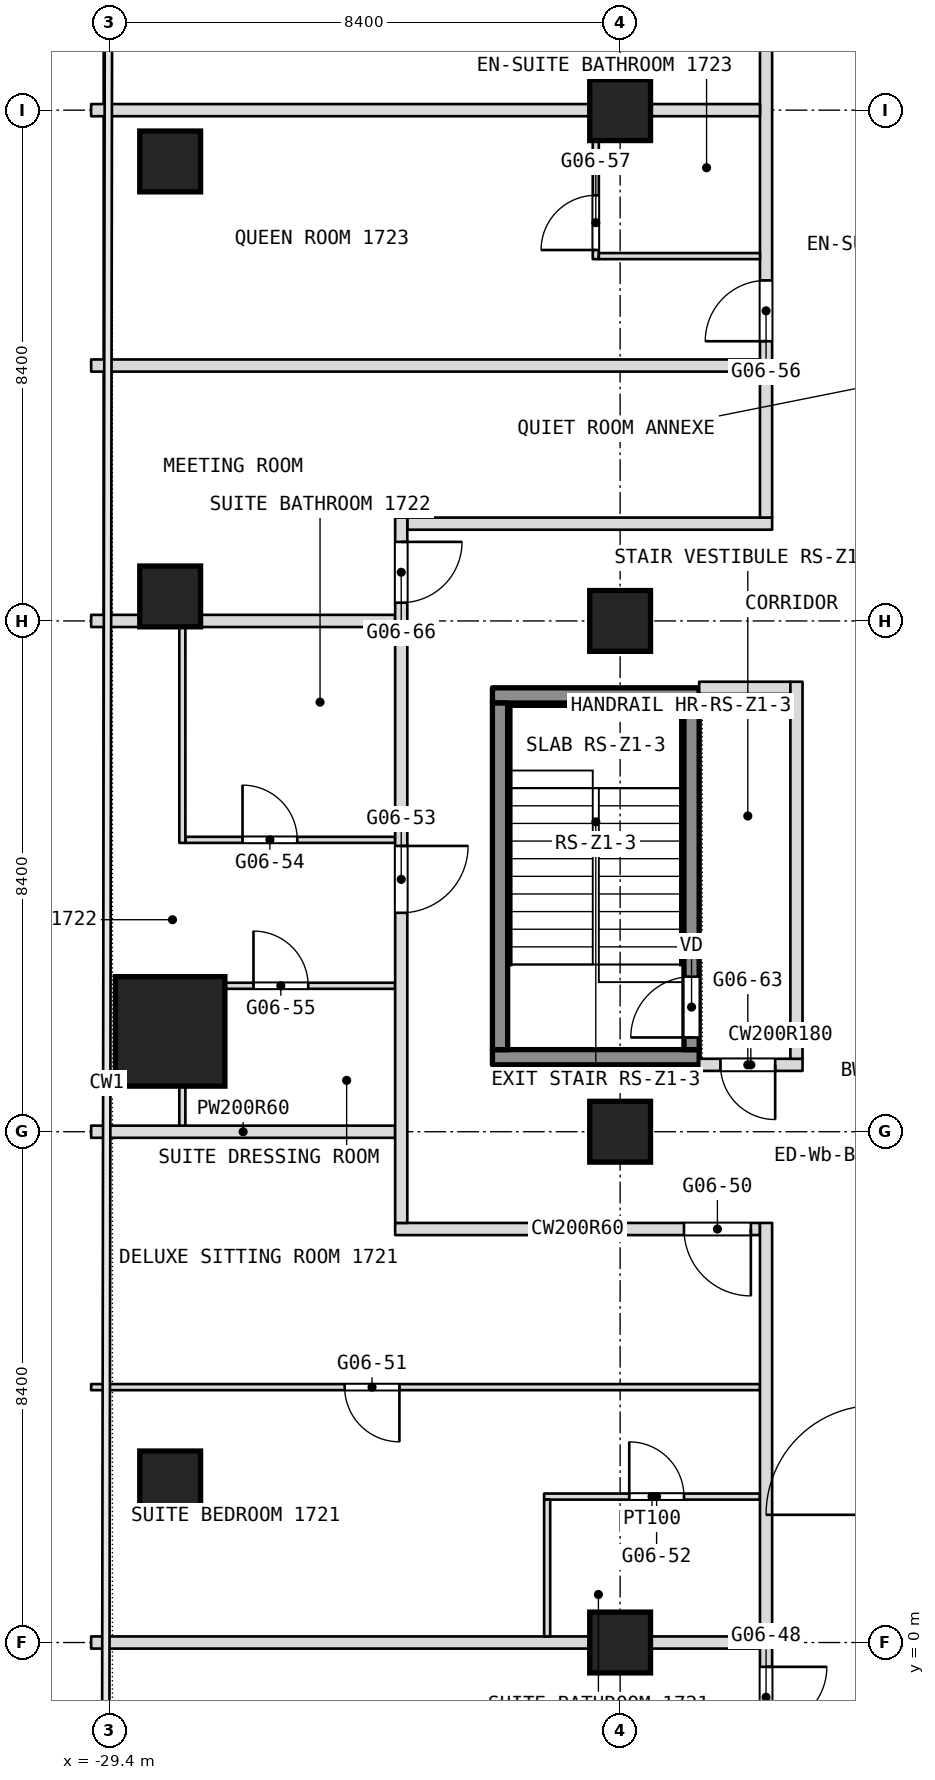
"""IFC4 building model, lengths in metres.
Left out: names, types, materials, properties, quantities, classifications, styles, units other than length and angle.
Written with IfcOpenShell. Run it as: python <this file> out.ifc"""

import sys

from ifc_helpers import new_model, si_unit, direction, frame, frame_2d, origin, origin_2d, place, context, subcontext, project, spatial, rectangle, extrude, element, fill, save


model = new_model("IFC4")
c1 = context("Model", 3, precision=1e-05, world=origin(), true_north=direction((0.0, 1.0)))
c2 = subcontext(c1, "Body", "Model", "MODEL_VIEW")
j1 = project(units=[si_unit("LENGTHUNIT", "METRE"), si_unit("PLANEANGLEUNIT", "RADIAN")], contexts=[c1])
p1 = place(None, origin())
s1 = spatial("IfcSite", under=j1, at=p1, CompositionType="ELEMENT")
p2 = place(p1, origin())
s2 = spatial("IfcBuilding", under=s1, at=p2, CompositionType="ELEMENT")
p3 = place(p2, frame((0.0, 0.0, 76.1)))
s3 = spatial("IfcBuildingStorey", under=s2, at=p3, CompositionType="ELEMENT", Elevation=76.1)
p4 = place(p3, frame((-28.4, 10.05, 0.0), z_axis=(0.0, 0.0, 1.0), x_axis=(1.0, 0.0, 0.0)))
e1 = element("IfcColumn", 1, at=p4, inside=s3, PredefinedType="COLUMN", context=c2, shape_type="SweptSolid", body=[
    extrude(rectangle(XDim=1.8, YDim=1.8, at=origin_2d()), origin(), (0.0, 0.0, 1.0), 3.6),
])
for number, where, z_axis, x_axis in (
    (2, (-21.0, 0.0, 0.0), (0.0, 0.0, 1.0), (1.0, 0.0, 0.0)),
    (3, (-21.0, 8.4, 0.0), (0.0, 0.0, 1.0), (1.0, 0.0, 0.0)),
    (4, (-21.0, 16.8, 0.0), (0.0, 0.0, 1.0), (1.0, 0.0, 0.0)),
    (5, (-21.0, 25.2, 0.0), (0.0, 0.0, 1.0), (1.0, 0.0, 0.0)),
    (6, (-28.4, 2.649, 0.0), (0.0, 0.0, 1.0), (1.0, 0.0, 0.0)),
    (7, (-28.4, 17.203, 0.0), (0.0, 0.0, 1.0), (1.0, 0.0, 0.0)),
    (8, (-28.4, 24.356, 0.0), (0.0, 0.0, 1.0), (1.0, 0.0, 0.0)),
):
    element("IfcColumn", number, at=place(p3, frame(where, z_axis=z_axis, x_axis=x_axis)), inside=s3, PredefinedType="COLUMN", context=c2, shape_type="SweptSolid", body=[
        extrude(rectangle(XDim=1.0, YDim=1.0, at=origin_2d()), origin(), (0.0, 0.0, 1.0), 3.6),
    ])
p5 = place(p3, frame((-29.7, 0.0, 0.0), z_axis=(0.0, 0.0, 1.0), x_axis=(1.0, 0.0, 0.0)))
e9 = element("IfcWall", 9, at=p5, inside=s3, PredefinedType="PARTITIONING", context=c2, shape_type="SweptSolid", body=[
    extrude(rectangle(XDim=11.0, YDim=0.2, at=frame_2d((5.5, 0.0))), origin(), (0.0, 0.0, 1.0), 2.84),
])
p6 = place(p3, frame((-22.25, 2.4, 0.0), z_axis=(0.0, 0.0, 1.0), x_axis=(1.0, 0.0, 0.0)))
e10 = element("IfcWall", 10, at=p6, inside=s3, PredefinedType="PARTITIONING", context=c2, shape_type="SweptSolid", body=[
    extrude(rectangle(XDim=3.55, YDim=0.1, at=frame_2d((1.775, 0.0))), origin(), (0.0, 0.0, 1.0), 3.34),
])
p7 = place(p6, frame((1.4, 0.0, 0.0)))
e11 = element("IfcOpeningElement", 11, at=p7, cuts=e10, PredefinedType="OPENING", context=c2, shape_type="SweptSolid", body=[
    extrude(rectangle(XDim=0.9, YDim=2.1, at=frame_2d((0.45, 1.05))), frame((0.0, 0.05, 0.0), z_axis=(0.0, -1.0, 0.0), x_axis=(1.0, 0.0, 0.0)), (0.0, 0.0, 1.0), 0.1),
])
p8 = place(p3, frame((-29.7, 4.2, 0.0), z_axis=(0.0, 0.0, 1.0), x_axis=(1.0, 0.0, 0.0)))
e12 = element("IfcWall", 12, at=p8, inside=s3, PredefinedType="PARTITIONING", context=c2, shape_type="SweptSolid", body=[
    extrude(rectangle(XDim=11.0, YDim=0.1, at=frame_2d((5.5, 0.0))), origin(), (0.0, 0.0, 1.0), 3.34),
])
p9 = place(p8, frame((4.17, 0.0, 0.0)))
e13 = element("IfcOpeningElement", 13, at=p9, cuts=e12, PredefinedType="OPENING", context=c2, shape_type="SweptSolid", body=[
    extrude(rectangle(XDim=0.9, YDim=2.1, at=frame_2d((0.45, 1.05))), frame((0.0, 0.05, 0.0), z_axis=(0.0, -1.0, 0.0), x_axis=(1.0, 0.0, 0.0)), (0.0, 0.0, 1.0), 0.1),
])
p10 = place(p3, frame((-24.7, 6.8, 0.0), z_axis=(0.0, 0.0, 1.0), x_axis=(1.0, 0.0, 0.0)))
e14 = element("IfcWall", 14, at=p10, inside=s3, PredefinedType="PARTITIONING", context=c2, shape_type="SweptSolid", body=[
    extrude(rectangle(XDim=6.0, YDim=0.2, at=frame_2d((3.0, 0.0))), origin(), (0.0, 0.0, 1.0), 3.34),
])
p11 = place(p10, frame((4.75, 0.0, 0.0)))
e15 = element("IfcOpeningElement", 15, at=p11, cuts=e14, PredefinedType="OPENING", context=c2, shape_type="SweptSolid", body=[
    extrude(rectangle(XDim=1.1, YDim=2.1, at=frame_2d((0.55, 1.05))), frame((0.0, 0.1, 0.0), z_axis=(0.0, -1.0, 0.0), x_axis=(1.0, 0.0, 0.0)), (0.0, 0.0, 1.0), 0.2),
])
p12 = place(p3, frame((-29.7, 8.4, 0.0), z_axis=(0.0, 0.0, 1.0), x_axis=(1.0, 0.0, 0.0)))
e16 = element("IfcWall", 16, at=p12, inside=s3, PredefinedType="PARTITIONING", context=c2, shape_type="SweptSolid", body=[
    extrude(rectangle(XDim=5.0, YDim=0.2, at=frame_2d((2.5, 0.0))), origin(), (0.0, 0.0, 1.0), 2.84),
])
p13 = place(p3, frame((-19.7, 9.5, 0.0), z_axis=(0.0, 0.0, 1.0), x_axis=(1.0, 0.0, 0.0)))
e17 = element("IfcWall", 17, at=p13, inside=s3, PredefinedType="PARTITIONING", context=c2, shape_type="SweptSolid", body=[
    extrude(rectangle(XDim=1.7, YDim=0.2, at=frame_2d((0.85, 0.0))), origin(), (0.0, 0.0, 1.0), 3.34),
])
p14 = place(p13, frame((0.35, 0.0, 0.0)))
e18 = element("IfcOpeningElement", 18, at=p14, cuts=e17, PredefinedType="OPENING", context=c2, shape_type="SweptSolid", body=[
    extrude(rectangle(XDim=0.9, YDim=2.1, at=frame_2d((0.45, 1.05))), frame((0.0, 0.1, 0.0), z_axis=(0.0, -1.0, 0.0), x_axis=(1.0, 0.0, 0.0)), (0.0, 0.0, 1.0), 0.2),
])
p15 = place(p3, frame((-27.5, 10.8, 0.0), z_axis=(0.0, 0.0, 1.0), x_axis=(1.0, 0.0, 0.0)))
e19 = element("IfcWall", 19, at=p15, inside=s3, PredefinedType="PARTITIONING", context=c2, shape_type="SweptSolid", body=[
    extrude(rectangle(XDim=2.8, YDim=0.1, at=frame_2d((1.4, 0.0))), origin(), (0.0, 0.0, 1.0), 3.34),
])
p16 = place(p15, frame((0.47, 0.0, 0.0)))
e20 = element("IfcOpeningElement", 20, at=p16, cuts=e19, PredefinedType="OPENING", context=c2, shape_type="SweptSolid", body=[
    extrude(rectangle(XDim=0.9, YDim=2.1, at=frame_2d((0.45, 1.05))), frame((0.0, 0.05, 0.0), z_axis=(0.0, -1.0, 0.0), x_axis=(1.0, 0.0, 0.0)), (0.0, 0.0, 1.0), 0.1),
])
p17 = place(p3, frame((-28.15, 13.2, 0.0), z_axis=(0.0, 0.0, 1.0), x_axis=(1.0, 0.0, 0.0)))
e21 = element("IfcWall", 21, at=p17, inside=s3, PredefinedType="PARTITIONING", context=c2, shape_type="SweptSolid", body=[
    extrude(rectangle(XDim=3.45, YDim=0.1, at=frame_2d((1.725, 0.0))), origin(), (0.0, 0.0, 1.0), 3.34),
])
p18 = place(p17, frame((0.94, 0.0, 0.0)))
e22 = element("IfcOpeningElement", 22, at=p18, cuts=e21, PredefinedType="OPENING", context=c2, shape_type="SweptSolid", body=[
    extrude(rectangle(XDim=0.9, YDim=2.1, at=frame_2d((0.45, 1.05))), frame((0.0, 0.05, 0.0), z_axis=(0.0, -1.0, 0.0), x_axis=(1.0, 0.0, 0.0)), (0.0, 0.0, 1.0), 0.1),
])
p19 = place(p3, frame((-19.7, 15.7, 0.0), z_axis=(0.0, 0.0, 1.0), x_axis=(1.0, 0.0, 0.0)))
e23 = element("IfcWall", 23, at=p19, inside=s3, PredefinedType="PARTITIONING", context=c2, shape_type="SweptSolid", body=[
    extrude(rectangle(XDim=1.5, YDim=0.2, at=frame_2d((0.75, 0.0))), origin(), (0.0, 0.0, 1.0), 3.34),
])
p20 = place(p3, frame((-29.7, 16.8, 0.0), z_axis=(0.0, 0.0, 1.0), x_axis=(1.0, 0.0, 0.0)))
e24 = element("IfcWall", 24, at=p20, inside=s3, PredefinedType="PARTITIONING", context=c2, shape_type="SweptSolid", body=[
    extrude(rectangle(XDim=5.0, YDim=0.2, at=frame_2d((2.5, 0.0))), origin(), (0.0, 0.0, 1.0), 2.84),
])
p21 = place(p3, frame((-18.1, 9.6, 0.0), z_axis=(0.0, 0.0, 1.0), x_axis=(0.0, 1.0, 0.0)))
e25 = element("IfcWall", 25, at=p21, inside=s3, PredefinedType="PARTITIONING", context=c2, shape_type="SweptSolid", body=[
    extrude(rectangle(XDim=6.2, YDim=0.2, at=frame_2d((3.1, 0.0))), origin(), (0.0, 0.0, 1.0), 3.34),
])
p22 = place(p3, frame((-24.5, 18.4, 0.0), z_axis=(0.0, 0.0, 1.0), x_axis=(1.0, 0.0, 0.0)))
e26 = element("IfcWall", 26, at=p22, inside=s3, PredefinedType="PARTITIONING", context=c2, shape_type="SweptSolid", body=[
    extrude(rectangle(XDim=6.0, YDim=0.2, at=frame_2d((3.0, 0.0))), origin(), (0.0, 0.0, 1.0), 3.34),
])
p23 = place(p3, frame((-18.6, -16.665, 0.0), z_axis=(0.0, 0.0, 1.0), x_axis=(0.0, 1.0, 0.0)))
e27 = element("IfcWall", 27, at=p23, inside=s3, PredefinedType="PARTITIONING", context=c2, shape_type="SweptSolid", body=[
    extrude(rectangle(XDim=23.565, YDim=0.2, at=frame_2d((11.782, 0.0))), origin(), (0.0, 0.0, 1.0), 3.34),
])
p24 = place(p23, frame((2.991, 0.0, 0.0)))
e28 = element("IfcOpeningElement", 28, at=p24, cuts=e27, PredefinedType="OPENING", context=c2, shape_type="SweptSolid", body=[
    extrude(rectangle(XDim=1.0, YDim=2.1, at=frame_2d((0.5, 1.05))), frame((0.0, 0.1, 0.0), z_axis=(0.0, -1.0, 0.0), x_axis=(1.0, 0.0, 0.0)), (0.0, 0.0, 1.0), 0.2),
])
p25 = place(p23, frame((4.574, 0.0, 0.0)))
e29 = element("IfcOpeningElement", 29, at=p25, cuts=e27, PredefinedType="OPENING", context=c2, shape_type="SweptSolid", body=[
    extrude(rectangle(XDim=1.0, YDim=2.1, at=frame_2d((0.5, 1.05))), frame((0.0, 0.1, 0.0), z_axis=(0.0, -1.0, 0.0), x_axis=(1.0, 0.0, 0.0)), (0.0, 0.0, 1.0), 0.2),
])
p26 = place(p23, frame((8.665, 0.0, 0.0)))
e30 = element("IfcOpeningElement", 30, at=p26, cuts=e27, PredefinedType="OPENING", context=c2, shape_type="SweptSolid", body=[
    extrude(rectangle(XDim=1.0, YDim=2.1, at=frame_2d((0.5, 1.05))), frame((0.0, 0.1, 0.0), z_axis=(0.0, -1.0, 0.0), x_axis=(1.0, 0.0, 0.0)), (0.0, 0.0, 1.0), 0.2),
])
p27 = place(p23, frame((15.265, 0.0, 0.0)))
e31 = element("IfcOpeningElement", 31, at=p27, cuts=e27, PredefinedType="OPENING", context=c2, shape_type="SweptSolid", body=[
    extrude(rectangle(XDim=1.0, YDim=2.1, at=frame_2d((0.5, 1.05))), frame((0.0, 0.1, 0.0), z_axis=(0.0, -1.0, 0.0), x_axis=(1.0, 0.0, 0.0)), (0.0, 0.0, 1.0), 0.2),
])
p28 = place(p3, frame((-18.6, 18.5, 0.0), z_axis=(0.0, 0.0, 1.0), x_axis=(0.0, 1.0, 0.0)))
e32 = element("IfcWall", 32, at=p28, inside=s3, PredefinedType="PARTITIONING", context=c2, shape_type="SweptSolid", body=[
    extrude(rectangle(XDim=15.04, YDim=0.2, at=frame_2d((7.52, 0.0))), origin(), (0.0, 0.0, 1.0), 3.34),
])
p29 = place(p28, frame((2.9, 0.0, 0.0)))
e33 = element("IfcOpeningElement", 33, at=p29, cuts=e32, PredefinedType="OPENING", context=c2, shape_type="SweptSolid", body=[
    extrude(rectangle(XDim=1.0, YDim=2.1, at=frame_2d((0.5, 1.05))), frame((0.0, 0.1, 0.0), z_axis=(0.0, -1.0, 0.0), x_axis=(1.0, 0.0, 0.0)), (0.0, 0.0, 1.0), 0.2),
])
p30 = place(p28, frame((8.25, 0.0, 0.0)))
e34 = element("IfcOpeningElement", 34, at=p30, cuts=e32, PredefinedType="OPENING", context=c2, shape_type="SweptSolid", body=[
    extrude(rectangle(XDim=1.1, YDim=2.1, at=frame_2d((0.55, 1.05))), frame((0.0, 0.1, 0.0), z_axis=(0.0, -1.0, 0.0), x_axis=(1.0, 0.0, 0.0)), (0.0, 0.0, 1.0), 0.2),
])
p31 = place(p3, frame((-29.7, 21.0, 0.0), z_axis=(0.0, 0.0, 1.0), x_axis=(1.0, 0.0, 0.0)))
e35 = element("IfcWall", 35, at=p31, inside=s3, PredefinedType="PARTITIONING", context=c2, shape_type="SweptSolid", body=[
    extrude(rectangle(XDim=11.0, YDim=0.2, at=frame_2d((5.5, 0.0))), origin(), (0.0, 0.0, 1.0), 3.34),
])
p32 = place(p3, frame((-21.4, 22.75, 0.0), z_axis=(0.0, 0.0, 1.0), x_axis=(0.0, 1.0, 0.0)))
e36 = element("IfcWall", 36, at=p32, inside=s3, PredefinedType="PARTITIONING", context=c2, shape_type="SweptSolid", body=[
    extrude(rectangle(XDim=2.55, YDim=0.1, at=frame_2d((1.275, 0.0))), origin(), (0.0, 0.0, 1.0), 3.34),
])
p33 = place(p32, frame((0.15, 0.0, 0.0)))
e37 = element("IfcOpeningElement", 37, at=p33, cuts=e36, PredefinedType="OPENING", context=c2, shape_type="SweptSolid", body=[
    extrude(rectangle(XDim=0.9, YDim=2.1, at=frame_2d((0.45, 1.05))), frame((0.0, 0.05, 0.0), z_axis=(0.0, -1.0, 0.0), x_axis=(1.0, 0.0, 0.0)), (0.0, 0.0, 1.0), 0.1),
])
p34 = place(p3, frame((-22.2, 0.1, 0.0), z_axis=(0.0, 0.0, 1.0), x_axis=(0.0, 1.0, 0.0)))
e38 = element("IfcWall", 38, at=p34, inside=s3, PredefinedType="PARTITIONING", context=c2, shape_type="SweptSolid", body=[
    extrude(rectangle(XDim=2.25, YDim=0.1, at=frame_2d((1.125, 0.0))), origin(), (0.0, 0.0, 1.0), 3.34),
])
p35 = place(p3, frame((-21.35, 22.8, 0.0), z_axis=(0.0, 0.0, 1.0), x_axis=(1.0, 0.0, 0.0)))
e39 = element("IfcWall", 39, at=p35, inside=s3, PredefinedType="PARTITIONING", context=c2, shape_type="SweptSolid", body=[
    extrude(rectangle(XDim=2.65, YDim=0.1, at=frame_2d((1.325, 0.0))), origin(), (0.0, 0.0, 1.0), 3.34),
])
p36 = place(p3, frame((-24.6, 6.9, 0.0), z_axis=(0.0, 0.0, 1.0), x_axis=(0.0, 1.0, 0.0)))
e40 = element("IfcWall", 40, at=p36, inside=s3, PredefinedType="PARTITIONING", context=c2, shape_type="SweptSolid", body=[
    extrude(rectangle(XDim=11.6, YDim=0.2, at=frame_2d((5.8, 0.0))), origin(), (0.0, 0.0, 1.0), 3.34),
])
p37 = place(p36, frame((5.1, 0.0, 0.0)))
e41 = element("IfcOpeningElement", 41, at=p37, cuts=e40, PredefinedType="OPENING", context=c2, shape_type="SweptSolid", body=[
    extrude(rectangle(XDim=1.1, YDim=2.1, at=frame_2d((0.55, 1.05))), frame((0.0, 0.1, 0.0), z_axis=(0.0, -1.0, 0.0), x_axis=(1.0, 0.0, 0.0)), (0.0, 0.0, 1.0), 0.2),
])
p38 = place(p36, frame((10.2, 0.0, 0.0)))
e42 = element("IfcOpeningElement", 42, at=p38, cuts=e40, PredefinedType="OPENING", context=c2, shape_type="SweptSolid", body=[
    extrude(rectangle(XDim=1.0, YDim=2.1, at=frame_2d((0.5, 1.05))), frame((0.0, 0.1, 0.0), z_axis=(0.0, -1.0, 0.0), x_axis=(1.0, 0.0, 0.0)), (0.0, 0.0, 1.0), 0.2),
])
p39 = place(p3, frame((-29.7, 25.2, 0.0), z_axis=(0.0, 0.0, 1.0), x_axis=(1.0, 0.0, 0.0)))
e43 = element("IfcWall", 43, at=p39, inside=s3, PredefinedType="PARTITIONING", context=c2, shape_type="SweptSolid", body=[
    extrude(rectangle(XDim=11.0, YDim=0.2, at=frame_2d((5.5, 0.0))), origin(), (0.0, 0.0, 1.0), 2.84),
])
p40 = place(p3, frame((-28.2, 8.5, 0.0), z_axis=(0.0, 0.0, 1.0), x_axis=(0.0, 1.0, 0.0)))
e44 = element("IfcWall", 44, at=p40, inside=s3, PredefinedType="PARTITIONING", context=c2, shape_type="SweptSolid", body=[
    extrude(rectangle(XDim=0.65, YDim=0.1, at=frame_2d((0.325, 0.0))), origin(), (0.0, 0.0, 1.0), 2.94),
])
p41 = place(p3, frame((-28.2, 13.15, 0.0), z_axis=(0.0, 0.0, 1.0), x_axis=(0.0, 1.0, 0.0)))
e45 = element("IfcWall", 45, at=p41, inside=s3, PredefinedType="PARTITIONING", context=c2, shape_type="SweptSolid", body=[
    extrude(rectangle(XDim=3.75, YDim=0.1, at=frame_2d((1.875, 0.0))), origin(), (0.0, 0.0, 1.0), 2.94),
])
for number, where, z_axis, x_axis in (
    (46, (-23.1, 9.625, 0.1), (0.0, 0.0, 1.0), (1.0, 0.0, 0.0)),
    (47, (-23.1, 15.575, 0.1), (0.0, 0.0, 1.0), (1.0, 0.0, 0.0)),
):
    element("IfcWall", number, at=place(p3, frame(where, z_axis=z_axis, x_axis=x_axis)), inside=s3, PredefinedType="SHEAR", context=c2, shape_type="SweptSolid", body=[
        extrude(rectangle(XDim=3.4, YDim=0.25, at=frame_2d((1.7, 0.0))), origin(), (0.0, 0.0, 1.0), 3.6),
    ])
p42 = place(p3, frame((-22.975, 9.75, 0.1), z_axis=(0.0, 0.0, 1.0), x_axis=(0.0, 1.0, 0.0)))
e48 = element("IfcWall", 48, at=p42, inside=s3, PredefinedType="SHEAR", context=c2, shape_type="SweptSolid", body=[
    extrude(rectangle(XDim=5.7, YDim=0.25, at=frame_2d((2.85, 0.0))), origin(), (0.0, 0.0, 1.0), 3.6),
])
p43 = place(p3, frame((-19.825, 9.75, 0.1), z_axis=(0.0, 0.0, 1.0), x_axis=(0.0, 1.0, 0.0)))
e49 = element("IfcWall", 49, at=p43, inside=s3, PredefinedType="SHEAR", context=c2, shape_type="SweptSolid", body=[
    extrude(rectangle(XDim=5.7, YDim=0.25, at=frame_2d((2.85, 0.0))), origin(), (0.0, 0.0, 1.0), 3.6),
])
p44 = place(p43, frame((0.2, 0.0, 0.0)))
e50 = element("IfcOpeningElement", 50, at=p44, cuts=e49, PredefinedType="OPENING", context=c2, shape_type="SweptSolid", body=[
    extrude(rectangle(XDim=1.0, YDim=2.1, at=frame_2d((0.5, 1.05))), frame((0.0, 0.125, 0.0), z_axis=(0.0, -1.0, 0.0), x_axis=(1.0, 0.0, 0.0)), (0.0, 0.0, 1.0), 0.25),
])
p45 = place(p7, origin())
e51 = element("IfcDoor", 51, at=p45, inside=s3, OperationType="SINGLE_SWING_LEFT", PredefinedType="DOOR", context=c2, shape_type="SweptSolid", body=[
    extrude(rectangle(XDim=0.9, YDim=2.1, at=frame_2d((0.45, 1.05))), frame((0.0, 0.025, 0.0), z_axis=(0.0, -1.0, 0.0), x_axis=(1.0, 0.0, 0.0)), (0.0, 0.0, 1.0), 0.05),
])
fill(e11, e51)
p46 = place(p9, origin())
e52 = element("IfcDoor", 52, at=p46, inside=s3, OperationType="SINGLE_SWING_LEFT", PredefinedType="DOOR", context=c2, shape_type="SweptSolid", body=[
    extrude(rectangle(XDim=0.9, YDim=2.1, at=frame_2d((0.45, 1.05))), frame((0.0, 0.025, 0.0), z_axis=(0.0, -1.0, 0.0), x_axis=(1.0, 0.0, 0.0)), (0.0, 0.0, 1.0), 0.05),
])
fill(e13, e52)
p47 = place(p11, origin())
e53 = element("IfcDoor", 53, at=p47, inside=s3, OperationType="SINGLE_SWING_LEFT", PredefinedType="DOOR", context=c2, shape_type="SweptSolid", body=[
    extrude(rectangle(XDim=1.1, YDim=2.1, at=frame_2d((0.55, 1.05))), frame((0.0, 0.025, 0.0), z_axis=(0.0, -1.0, 0.0), x_axis=(1.0, 0.0, 0.0)), (0.0, 0.0, 1.0), 0.05),
])
fill(e15, e53)
p48 = place(p14, origin())
e54 = element("IfcDoor", 54, at=p48, inside=s3, OperationType="SINGLE_SWING_RIGHT", PredefinedType="DOOR", context=c2, shape_type="SweptSolid", body=[
    extrude(rectangle(XDim=0.9, YDim=2.1, at=frame_2d((0.45, 1.05))), frame((0.0, 0.025, 0.0), z_axis=(0.0, -1.0, 0.0), x_axis=(1.0, 0.0, 0.0)), (0.0, 0.0, 1.0), 0.05),
])
fill(e18, e54)
p49 = place(p16, origin())
e55 = element("IfcDoor", 55, at=p49, inside=s3, OperationType="SINGLE_SWING_RIGHT", PredefinedType="DOOR", context=c2, shape_type="SweptSolid", body=[
    extrude(rectangle(XDim=0.9, YDim=2.1, at=frame_2d((0.45, 1.05))), frame((0.0, 0.025, 0.0), z_axis=(0.0, -1.0, 0.0), x_axis=(1.0, 0.0, 0.0)), (0.0, 0.0, 1.0), 0.05),
])
fill(e20, e55)
p50 = place(p18, origin())
e56 = element("IfcDoor", 56, at=p50, inside=s3, OperationType="SINGLE_SWING_LEFT", PredefinedType="DOOR", context=c2, shape_type="SweptSolid", body=[
    extrude(rectangle(XDim=0.9, YDim=2.1, at=frame_2d((0.45, 1.05))), frame((0.0, 0.025, 0.0), z_axis=(0.0, -1.0, 0.0), x_axis=(1.0, 0.0, 0.0)), (0.0, 0.0, 1.0), 0.05),
])
fill(e22, e56)
p51 = place(p27, origin())
e57 = element("IfcDoor", 57, at=p51, inside=s3, OperationType="SINGLE_SWING_LEFT", PredefinedType="DOOR", context=c2, shape_type="SweptSolid", body=[
    extrude(rectangle(XDim=1.0, YDim=2.1, at=frame_2d((0.5, 1.05))), frame((0.0, 0.025, 0.0), z_axis=(0.0, -1.0, 0.0), x_axis=(1.0, 0.0, 0.0)), (0.0, 0.0, 1.0), 0.05),
])
fill(e31, e57)
p52 = place(p29, origin())
e58 = element("IfcDoor", 58, at=p52, inside=s3, OperationType="SINGLE_SWING_LEFT", PredefinedType="DOOR", context=c2, shape_type="SweptSolid", body=[
    extrude(rectangle(XDim=1.0, YDim=2.1, at=frame_2d((0.5, 1.05))), frame((0.0, 0.025, 0.0), z_axis=(0.0, -1.0, 0.0), x_axis=(1.0, 0.0, 0.0)), (0.0, 0.0, 1.0), 0.05),
])
fill(e33, e58)
p53 = place(p33, origin())
e59 = element("IfcDoor", 59, at=p53, inside=s3, OperationType="SINGLE_SWING_RIGHT", PredefinedType="DOOR", context=c2, shape_type="SweptSolid", body=[
    extrude(rectangle(XDim=0.9, YDim=2.1, at=frame_2d((0.45, 1.05))), frame((0.0, 0.025, 0.0), z_axis=(0.0, -1.0, 0.0), x_axis=(1.0, 0.0, 0.0)), (0.0, 0.0, 1.0), 0.05),
])
fill(e37, e59)
p54 = place(p37, origin())
e60 = element("IfcDoor", 60, at=p54, inside=s3, OperationType="SINGLE_SWING_RIGHT", PredefinedType="DOOR", context=c2, shape_type="SweptSolid", body=[
    extrude(rectangle(XDim=1.1, YDim=2.1, at=frame_2d((0.55, 1.05))), frame((0.0, 0.025, 0.0), z_axis=(0.0, -1.0, 0.0), x_axis=(1.0, 0.0, 0.0)), (0.0, 0.0, 1.0), 0.05),
])
fill(e41, e60)
p55 = place(p38, origin())
e61 = element("IfcDoor", 61, at=p55, inside=s3, OperationType="SINGLE_SWING_RIGHT", PredefinedType="DOOR", context=c2, shape_type="SweptSolid", body=[
    extrude(rectangle(XDim=1.0, YDim=2.1, at=frame_2d((0.5, 1.05))), frame((0.0, 0.025, 0.0), z_axis=(0.0, -1.0, 0.0), x_axis=(1.0, 0.0, 0.0)), (0.0, 0.0, 1.0), 0.05),
])
fill(e42, e61)
p56 = place(p44, origin())
e62 = element("IfcDoor", 62, at=p56, inside=s3, OperationType="SINGLE_SWING_LEFT", PredefinedType="DOOR", context=c2, shape_type="SweptSolid", body=[
    extrude(rectangle(XDim=1.0, YDim=2.1, at=frame_2d((0.5, 1.05))), frame((0.0, 0.025, 0.0), z_axis=(0.0, -1.0, 0.0), x_axis=(1.0, 0.0, 0.0)), (0.0, 0.0, 1.0), 0.05),
])
fill(e50, e62)
save(model, sys.argv[1])
